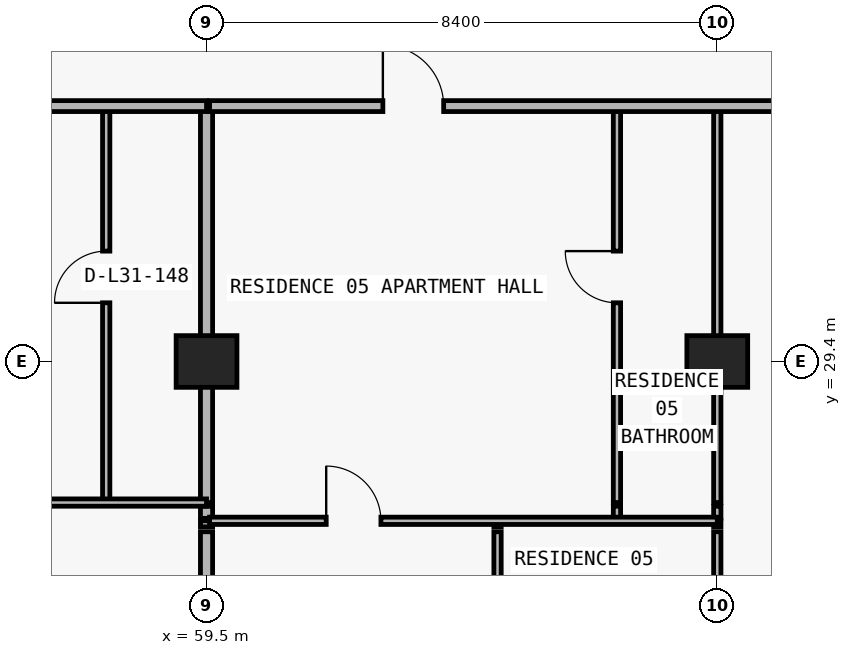
"""IFC4 building model, lengths in metres.
Left out: names, types, materials, properties, quantities, classifications, styles, units other than length and angle.
Written with IfcOpenShell. Run it as: python <this file> out.ifc"""

import sys

from ifc_helpers import new_model, si_unit, direction, frame, frame_2d, origin, origin_2d, place, context, subcontext, project, spatial, rectangle, extrude, element, fill, save


model = new_model("IFC4")
c1 = context("Model", 3, precision=1e-05, world=origin(), true_north=direction((0.0, 1.0)))
c2 = subcontext(c1, "Body", "Model", "MODEL_VIEW")
j1 = project(units=[si_unit("LENGTHUNIT", "METRE"), si_unit("PLANEANGLEUNIT", "RADIAN")], contexts=[c1])
p1 = place(None, origin())
s1 = spatial("IfcSite", under=j1, at=p1, CompositionType="ELEMENT")
p2 = place(p1, origin())
s2 = spatial("IfcBuilding", under=s1, at=p2, CompositionType="ELEMENT")
p3 = place(p2, frame((0.0, 0.0, 115.8)))
s3 = spatial("IfcBuildingStorey", under=s2, at=p3, CompositionType="ELEMENT", Elevation=115.8)
for number, where, z_axis, x_axis in (
    (1, (59.5, 29.4, 0.0), (0.0, 0.0, 1.0), (1.0, 0.0, 0.0)),
    (2, (67.9, 29.4, 0.0), (0.0, 0.0, 1.0), (1.0, 0.0, 0.0)),
):
    element("IfcColumn", number, at=place(p3, frame(where, z_axis=z_axis, x_axis=x_axis)), inside=s3, PredefinedType="COLUMN", context=c2, shape_type="SweptSolid", body=[
        extrude(rectangle(XDim=1.0, YDim=0.85, at=origin_2d()), origin(), (0.0, 0.0, 1.0), 3.05),
    ])
p4 = place(p3, frame((57.85, 27.08, 0.0), z_axis=(0.0, 0.0, 1.0), x_axis=(0.0, 1.0, 0.0)))
e3 = element("IfcWall", 3, at=p4, inside=s3, PredefinedType="PARTITIONING", context=c2, shape_type="SweptSolid", body=[
    extrude(rectangle(XDim=6.52, YDim=0.12, at=frame_2d((3.26, 0.0))), origin(), (0.0, 0.0, 1.0), 3.05),
])
p5 = place(p4, frame((3.285, 0.0, 0.0)))
e4 = element("IfcOpeningElement", 4, at=p5, cuts=e3, PredefinedType="OPENING", context=c2, shape_type="SweptSolid", body=[
    extrude(rectangle(XDim=0.85, YDim=2.1, at=frame_2d((0.425, 1.05))), frame((0.0, 0.07, 0.0), z_axis=(0.0, -1.0, 0.0), x_axis=(1.0, 0.0, 0.0)), (0.0, 0.0, 1.0), 0.14),
])
p6 = place(p3, frame((59.5, 22.22, 0.0), z_axis=(0.0, 0.0, 1.0), x_axis=(0.0, 1.0, 0.0)))
e5 = element("IfcWall", 5, at=p6, inside=s3, PredefinedType="PARTITIONING", context=c2, shape_type="SweptSolid", body=[
    extrude(rectangle(XDim=4.38, YDim=0.2, at=frame_2d((2.19, 0.0))), origin(), (0.0, 0.0, 1.0), 2.174),
])
p7 = place(p3, frame((59.5, 26.68, 0.0), z_axis=(0.0, 0.0, 1.0), x_axis=(0.0, 1.0, 0.0)))
e6 = element("IfcWall", 6, at=p7, inside=s3, PredefinedType="PARTITIONING", context=c2, shape_type="SweptSolid", body=[
    extrude(rectangle(XDim=0.1, YDim=0.2, at=frame_2d((0.05, 0.0))), origin(), (0.0, 0.0, 1.0), 2.174),
])
p8 = place(p3, frame((59.5, 26.82, 0.0), z_axis=(0.0, 0.0, 1.0), x_axis=(0.0, 1.0, 0.0)))
e7 = element("IfcWall", 7, at=p8, inside=s3, PredefinedType="PARTITIONING", context=c2, shape_type="SweptSolid", body=[
    extrude(rectangle(XDim=0.2, YDim=0.2, at=frame_2d((0.1, 0.0))), origin(), (0.0, 0.0, 1.0), 2.174),
])
p9 = place(p3, frame((59.5, 27.08, 0.0), z_axis=(0.0, 0.0, 1.0), x_axis=(0.0, 1.0, 0.0)))
e8 = element("IfcWall", 8, at=p9, inside=s3, PredefinedType="PARTITIONING", context=c2, shape_type="SweptSolid", body=[
    extrude(rectangle(XDim=6.52, YDim=0.2, at=frame_2d((3.26, 0.0))), origin(), (0.0, 0.0, 1.0), 2.174),
])
p10 = place(p3, frame((64.286, 22.22, 0.0), z_axis=(0.0, 0.0, 1.0), x_axis=(0.0, 1.0, 0.0)))
e9 = element("IfcWall", 9, at=p10, inside=s3, PredefinedType="PARTITIONING", context=c2, shape_type="SweptSolid", body=[
    extrude(rectangle(XDim=4.38, YDim=0.12, at=frame_2d((2.19, 0.0))), origin(), (0.0, 0.0, 1.0), 3.05),
])
p11 = place(p10, frame((1.74, 0.0, 0.0)))
e10 = element("IfcOpeningElement", 10, at=p11, cuts=e9, PredefinedType="OPENING", context=c2, shape_type="SweptSolid", body=[
    extrude(rectangle(XDim=0.9, YDim=2.15, at=frame_2d((0.45, 1.075))), frame((0.0, 0.07, 0.0), z_axis=(0.0, -1.0, 0.0), x_axis=(1.0, 0.0, 0.0)), (0.0, 0.0, 1.0), 0.14),
])
p12 = place(p3, frame((64.286, 26.68, 0.0), z_axis=(0.0, 0.0, 1.0), x_axis=(0.0, 1.0, 0.0)))
e11 = element("IfcWall", 11, at=p12, inside=s3, PredefinedType="PARTITIONING", context=c2, shape_type="SweptSolid", body=[
    extrude(rectangle(XDim=0.1, YDim=0.12, at=frame_2d((0.05, 0.0))), origin(), (0.0, 0.0, 1.0), 3.05),
])
p13 = place(p3, frame((66.25, 26.82, 0.0), z_axis=(0.0, 0.0, 1.0), x_axis=(0.0, 1.0, 0.0)))
e12 = element("IfcWall", 12, at=p13, inside=s3, PredefinedType="PARTITIONING", context=c2, shape_type="SweptSolid", body=[
    extrude(rectangle(XDim=0.2, YDim=0.12, at=frame_2d((0.1, 0.0))), origin(), (0.0, 0.0, 1.0), 3.05),
])
p14 = place(p3, frame((66.25, 27.08, 0.0), z_axis=(0.0, 0.0, 1.0), x_axis=(0.0, 1.0, 0.0)))
e13 = element("IfcWall", 13, at=p14, inside=s3, PredefinedType="PARTITIONING", context=c2, shape_type="SweptSolid", body=[
    extrude(rectangle(XDim=6.52, YDim=0.12, at=frame_2d((3.26, 0.0))), origin(), (0.0, 0.0, 1.0), 3.05),
])
p15 = place(p14, frame((3.285, 0.0, 0.0)))
e14 = element("IfcOpeningElement", 14, at=p15, cuts=e13, PredefinedType="OPENING", context=c2, shape_type="SweptSolid", body=[
    extrude(rectangle(XDim=0.85, YDim=2.1, at=frame_2d((0.425, 1.05))), frame((0.0, 0.07, 0.0), z_axis=(0.0, -1.0, 0.0), x_axis=(1.0, 0.0, 0.0)), (0.0, 0.0, 1.0), 0.14),
])
p16 = place(p3, frame((67.9, 22.22, 0.0), z_axis=(0.0, 0.0, 1.0), x_axis=(0.0, 1.0, 0.0)))
e15 = element("IfcWall", 15, at=p16, inside=s3, PredefinedType="PARTITIONING", context=c2, shape_type="SweptSolid", body=[
    extrude(rectangle(XDim=4.38, YDim=0.12, at=frame_2d((2.19, 0.0))), origin(), (0.0, 0.0, 1.0), 2.174),
])
p17 = place(p16, frame((1.74, 0.0, 0.0)))
e16 = element("IfcOpeningElement", 16, at=p17, cuts=e15, PredefinedType="OPENING", context=c2, shape_type="SweptSolid", body=[
    extrude(rectangle(XDim=0.9, YDim=2.124, at=frame_2d((0.45, 1.062))), frame((0.0, 0.07, 0.0), z_axis=(0.0, -1.0, 0.0), x_axis=(1.0, 0.0, 0.0)), (0.0, 0.0, 1.0), 0.14),
])
p18 = place(p3, frame((67.9, 26.68, 0.0), z_axis=(0.0, 0.0, 1.0), x_axis=(0.0, 1.0, 0.0)))
e17 = element("IfcWall", 17, at=p18, inside=s3, PredefinedType="PARTITIONING", context=c2, shape_type="SweptSolid", body=[
    extrude(rectangle(XDim=0.1, YDim=0.12, at=frame_2d((0.05, 0.0))), origin(), (0.0, 0.0, 1.0), 2.174),
])
p19 = place(p3, frame((67.9, 26.82, 0.0), z_axis=(0.0, 0.0, 1.0), x_axis=(0.0, 1.0, 0.0)))
e18 = element("IfcWall", 18, at=p19, inside=s3, PredefinedType="PARTITIONING", context=c2, shape_type="SweptSolid", body=[
    extrude(rectangle(XDim=0.2, YDim=0.12, at=frame_2d((0.1, 0.0))), origin(), (0.0, 0.0, 1.0), 2.174),
])
p20 = place(p3, frame((67.9, 27.08, 0.0), z_axis=(0.0, 0.0, 1.0), x_axis=(0.0, 1.0, 0.0)))
e19 = element("IfcWall", 19, at=p20, inside=s3, PredefinedType="PARTITIONING", context=c2, shape_type="SweptSolid", body=[
    extrude(rectangle(XDim=6.52, YDim=0.12, at=frame_2d((3.26, 0.0))), origin(), (0.0, 0.0, 1.0), 2.174),
])
p21 = place(p3, frame((59.55, 26.78, 0.0), z_axis=(0.0, 0.0, 1.0), x_axis=(1.0, 0.0, 0.0)))
e20 = element("IfcWall", 20, at=p21, inside=s3, PredefinedType="PARTITIONING", context=c2, shape_type="SweptSolid", body=[
    extrude(rectangle(XDim=8.35, YDim=0.12, at=frame_2d((4.175, 0.0))), origin(), (0.0, 0.0, 1.0), 3.05),
])
p22 = place(p21, frame((1.918, 0.0, 0.0)))
e21 = element("IfcOpeningElement", 21, at=p22, cuts=e20, PredefinedType="OPENING", context=c2, shape_type="SweptSolid", body=[
    extrude(rectangle(XDim=0.9, YDim=2.15, at=frame_2d((0.45, 1.075))), frame((0.0, 0.07, 0.0), z_axis=(0.0, -1.0, 0.0), x_axis=(1.0, 0.0, 0.0)), (0.0, 0.0, 1.0), 0.14),
])
p23 = place(p3, frame((51.32, 27.08, 0.0), z_axis=(0.0, 0.0, 1.0), x_axis=(1.0, 0.0, 0.0)))
e22 = element("IfcWall", 22, at=p23, inside=s3, PredefinedType="PARTITIONING", context=c2, shape_type="SweptSolid", body=[
    extrude(rectangle(XDim=8.18, YDim=0.12, at=frame_2d((4.09, 0.0))), origin(), (0.0, 0.0, 1.0), 3.05),
])
p24 = place(p23, frame((1.708, 0.0, 0.0)))
e23 = element("IfcOpeningElement", 23, at=p24, cuts=e22, PredefinedType="OPENING", context=c2, shape_type="SweptSolid", body=[
    extrude(rectangle(XDim=0.9, YDim=2.15, at=frame_2d((0.45, 1.075))), frame((0.0, 0.07, 0.0), z_axis=(0.0, -1.0, 0.0), x_axis=(1.0, 0.0, 0.0)), (0.0, 0.0, 1.0), 0.14),
])
p25 = place(p3, frame((18.3, 33.6, 0.0), z_axis=(0.0, 0.0, 1.0), x_axis=(1.0, 0.0, 0.0)))
e24 = element("IfcWall", 24, at=p25, inside=s3, PredefinedType="PARTITIONING", context=c2, shape_type="SweptSolid", body=[
    extrude(rectangle(XDim=41.2, YDim=0.18, at=frame_2d((20.6, 0.0))), origin(), (0.0, 0.0, 1.0), 3.05),
])
p26 = place(p25, frame((11.35, 0.0, 0.0)))
e25 = element("IfcOpeningElement", 25, at=p26, cuts=e24, PredefinedType="OPENING", context=c2, shape_type="SweptSolid", body=[
    extrude(rectangle(XDim=1.0, YDim=2.2, at=frame_2d((0.5, 1.1))), frame((0.0, 0.1, 0.0), z_axis=(0.0, -1.0, 0.0), x_axis=(1.0, 0.0, 0.0)), (0.0, 0.0, 1.0), 0.2),
])
p27 = place(p25, frame((27.275, 0.0, 0.0)))
e26 = element("IfcOpeningElement", 26, at=p27, cuts=e24, PredefinedType="OPENING", context=c2, shape_type="SweptSolid", body=[
    extrude(rectangle(XDim=1.0, YDim=2.2, at=frame_2d((0.5, 1.1))), frame((0.0, 0.1, 0.0), z_axis=(0.0, -1.0, 0.0), x_axis=(1.0, 0.0, 0.0)), (0.0, 0.0, 1.0), 0.2),
])
p28 = place(p25, frame((35.675, 0.0, 0.0)))
e27 = element("IfcOpeningElement", 27, at=p28, cuts=e24, PredefinedType="OPENING", context=c2, shape_type="SweptSolid", body=[
    extrude(rectangle(XDim=1.0, YDim=2.2, at=frame_2d((0.5, 1.1))), frame((0.0, 0.1, 0.0), z_axis=(0.0, -1.0, 0.0), x_axis=(1.0, 0.0, 0.0)), (0.0, 0.0, 1.0), 0.2),
])
p29 = place(p3, frame((59.55, 33.6, 0.0), z_axis=(0.0, 0.0, 1.0), x_axis=(1.0, 0.0, 0.0)))
e28 = element("IfcWall", 28, at=p29, inside=s3, PredefinedType="PARTITIONING", context=c2, shape_type="SweptSolid", body=[
    extrude(rectangle(XDim=10.55, YDim=0.18, at=frame_2d((5.275, 0.0))), origin(), (0.0, 0.0, 1.0), 3.05),
])
p30 = place(p29, frame((2.85, 0.0, 0.0)))
e29 = element("IfcOpeningElement", 29, at=p30, cuts=e28, PredefinedType="OPENING", context=c2, shape_type="SweptSolid", body=[
    extrude(rectangle(XDim=1.0, YDim=2.2, at=frame_2d((0.5, 1.1))), frame((0.0, 0.1, 0.0), z_axis=(0.0, -1.0, 0.0), x_axis=(1.0, 0.0, 0.0)), (0.0, 0.0, 1.0), 0.2),
])
p31 = place(p5, origin())
e30 = element("IfcDoor", 30, at=p31, inside=s3, OperationType="SINGLE_SWING_LEFT", PredefinedType="DOOR", context=c2, shape_type="SweptSolid", body=[
    extrude(rectangle(XDim=0.85, YDim=2.1, at=frame_2d((0.425, 1.05))), frame((0.0, 0.025, 0.0), z_axis=(0.0, -1.0, 0.0), x_axis=(1.0, 0.0, 0.0)), (0.0, 0.0, 1.0), 0.05),
])
fill(e4, e30)
p32 = place(p30, origin())
e31 = element("IfcDoor", 31, at=p32, inside=s3, OperationType="SINGLE_SWING_LEFT", PredefinedType="DOOR", context=c2, shape_type="SweptSolid", body=[
    extrude(rectangle(XDim=1.0, YDim=2.2, at=frame_2d((0.5, 1.1))), frame((0.0, 0.025, 0.0), z_axis=(0.0, -1.0, 0.0), x_axis=(1.0, 0.0, 0.0)), (0.0, 0.0, 1.0), 0.05),
])
fill(e29, e31)
p33 = place(p15, origin())
e32 = element("IfcDoor", 32, at=p33, inside=s3, OperationType="SINGLE_SWING_RIGHT", PredefinedType="DOOR", context=c2, shape_type="SweptSolid", body=[
    extrude(rectangle(XDim=0.85, YDim=2.1, at=frame_2d((0.425, 1.05))), frame((0.0, 0.025, 0.0), z_axis=(0.0, -1.0, 0.0), x_axis=(1.0, 0.0, 0.0)), (0.0, 0.0, 1.0), 0.05),
])
fill(e14, e32)
p34 = place(p22, origin())
e33 = element("IfcDoor", 33, at=p34, inside=s3, OperationType="SINGLE_SWING_LEFT", PredefinedType="DOOR", context=c2, shape_type="SweptSolid", body=[
    extrude(rectangle(XDim=0.9, YDim=2.15, at=frame_2d((0.45, 1.075))), frame((0.0, 0.025, 0.0), z_axis=(0.0, -1.0, 0.0), x_axis=(1.0, 0.0, 0.0)), (0.0, 0.0, 1.0), 0.05),
])
fill(e21, e33)
save(model, sys.argv[1])
